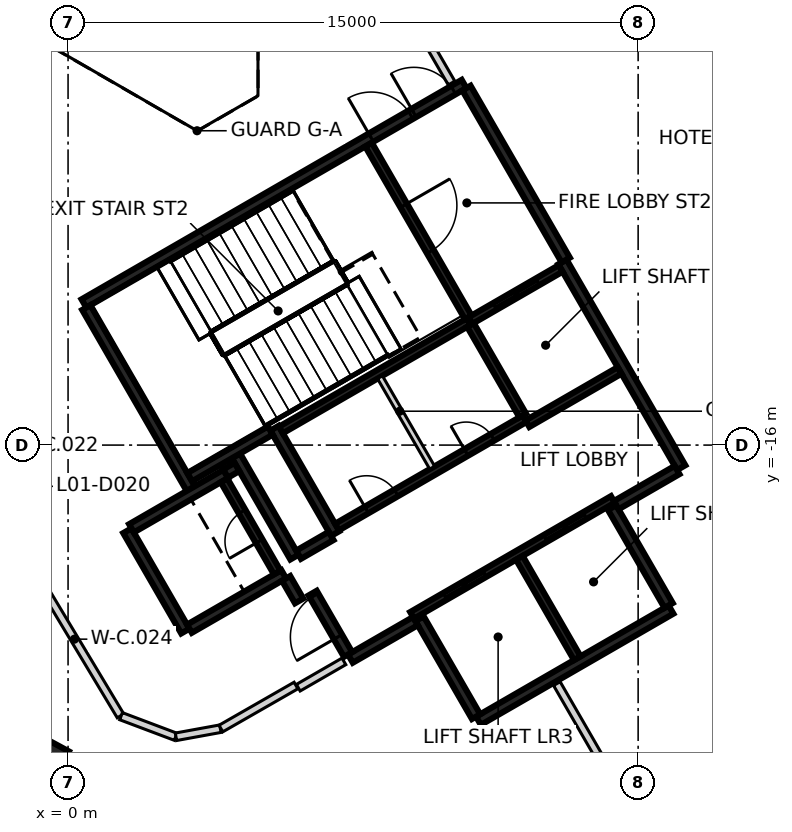
"""IFC4 building model, lengths in metres.
Left out: names, types, materials, properties, quantities, classifications, styles, units other than length and angle.
Written with IfcOpenShell. Run it as: python <this file> out.ifc"""

import sys

from ifc_helpers import new_model, si_unit, direction, frame, frame_2d, origin, origin_2d, place, context, subcontext, project, spatial, rectangle, extrude, element, fill, save


model = new_model("IFC4")
c1 = context("Model", 3, precision=1e-05, world=origin(), true_north=direction((0.0, 1.0)))
c2 = subcontext(c1, "Body", "Model", "MODEL_VIEW")
j1 = project(units=[si_unit("LENGTHUNIT", "METRE"), si_unit("PLANEANGLEUNIT", "RADIAN")], contexts=[c1])
p1 = place(None, origin())
s1 = spatial("IfcSite", under=j1, at=p1, CompositionType="ELEMENT")
p2 = place(p1, origin())
s2 = spatial("IfcBuilding", under=s1, at=p2, CompositionType="ELEMENT")
p3 = place(p2, frame((0.0, 0.0, 7.5)))
s3 = spatial("IfcBuildingStorey", under=s2, at=p3, CompositionType="ELEMENT", Elevation=7.5)
p4 = place(p3, frame((-1.197, -24.423, -0.4), z_axis=(0.0, 0.0, 1.0), x_axis=(0.476198301069, 0.879337920289, 0.0)))
e1 = element("IfcColumn", 1, at=p4, inside=s3, PredefinedType="COLUMN", context=c2, shape_type="SweptSolid", body=[
    extrude(rectangle(XDim=1.8, YDim=1.8, at=origin_2d()), origin(), (0.0, 0.0, 1.0), 4.15),
])
p5 = place(p3, frame((0.417, -12.273, 0.0), z_axis=(0.0, 0.0, 1.0), x_axis=(0.866021906294, 0.500006057782, 0.0)))
e2 = element("IfcWall", 2, at=p5, inside=s3, PredefinedType="SHEAR", context=c2, shape_type="SweptSolid", body=[
    extrude(rectangle(XDim=11.55, YDim=0.25, at=frame_2d((5.775, 0.0))), origin(), (0.0, 0.0, 1.0), 6.15),
])
p6 = place(p5, frame((10.025, 0.0, 0.0)))
e3 = element("IfcOpeningElement", 3, at=p6, cuts=e2, PredefinedType="OPENING", context=c2, shape_type="SweptSolid", body=[
    extrude(rectangle(XDim=1.2, YDim=2.1, at=frame_2d((0.6, 1.05))), frame((0.0, 0.135, 0.0), z_axis=(0.0, -1.0, 0.0), x_axis=(1.0, 0.0, 0.0)), (0.0, 0.0, 1.0), 0.27),
])
p7 = place(p5, frame((8.725, 0.0, 0.0)))
e4 = element("IfcOpeningElement", 4, at=p7, cuts=e2, PredefinedType="OPENING", context=c2, shape_type="SweptSolid", body=[
    extrude(rectangle(XDim=1.2, YDim=2.1, at=frame_2d((0.6, 1.05))), frame((0.0, 0.135, 0.0), z_axis=(0.0, -1.0, 0.0), x_axis=(1.0, 0.0, 0.0)), (0.0, 0.0, 1.0), 0.27),
])
p8 = place(p3, frame((13.008, -11.181, 0.0), z_axis=(0.0, 0.0, 1.0), x_axis=(0.500004234368, -0.866022959057, 0.0)))
e5 = element("IfcWall", 5, at=p8, inside=s3, PredefinedType="SHEAR", context=c2, shape_type="SweptSolid", body=[
    extrude(rectangle(XDim=6.25, YDim=0.25, at=frame_2d((3.125, 0.0))), origin(), (0.0, 0.0, 1.0), 6.15),
])
p9 = place(p3, frame((15.865, -20.328, 0.0), z_axis=(0.0, 0.0, 1.0), x_axis=(-0.86602852612, -0.499994591916, 0.0)))
e6 = element("IfcWall", 6, at=p9, inside=s3, PredefinedType="SHEAR", context=c2, shape_type="SweptSolid", body=[
    extrude(rectangle(XDim=5.85, YDim=0.25, at=frame_2d((2.925, 0.0))), origin(), (0.0, 0.0, 1.0), 6.15),
])
p10 = place(p3, frame((3.235, -17.153, 0.0), z_axis=(0.0, 0.0, 1.0), x_axis=(-0.500008851346, 0.866020293397, 0.0)))
e7 = element("IfcWall", 7, at=p10, inside=s3, PredefinedType="SHEAR", context=c2, shape_type="SweptSolid", body=[
    extrude(rectangle(XDim=5.51, YDim=0.25, at=frame_2d((2.755, 0.0))), origin(), (0.0, 0.0, 1.0), 6.15),
])
p11 = place(p3, frame((10.483, -6.606, 0.0), z_axis=(0.0, 0.0, 1.0), x_axis=(0.49999885962, -0.866026062182, 0.0)))
e8 = element("IfcWall", 8, at=p11, inside=s3, PredefinedType="SHEAR", context=c2, shape_type="SweptSolid", body=[
    extrude(rectangle(XDim=5.225, YDim=0.25, at=frame_2d((2.612, 0.0))), origin(), (0.0, 0.0, 1.0), 6.15),
])
p12 = place(p3, frame((7.031, -18.327, 0.0), z_axis=(0.0, 0.0, 1.0), x_axis=(-0.499971222258, 0.866042017984, 0.0)))
e9 = element("IfcWall", 9, at=p12, inside=s3, PredefinedType="SHEAR", context=c2, shape_type="SweptSolid", body=[
    extrude(rectangle(XDim=3.2, YDim=0.25, at=frame_2d((1.6, 0.0))), origin(), (0.0, 0.0, 1.0), 6.15),
])
for number, where, z_axis, x_axis in (
    (10, (14.315, -17.644, 0.0), (0.0, 0.0, 1.0), (0.5, -0.866, 0.0)),
    (11, (10.736, -23.145, 0.0), (0.0, 0.0, 1.0), (-0.5, 0.866, 0.0)),
):
    element("IfcWall", number, at=place(p3, frame(where, z_axis=z_axis, x_axis=x_axis)), inside=s3, PredefinedType="SHEAR", context=c2, shape_type="SweptSolid", body=[
        extrude(rectangle(XDim=2.974, YDim=0.25, at=frame_2d((1.487, 0.0))), origin(), (0.0, 0.0, 1.0), 6.15),
    ])
p13 = place(p3, frame((3.085, -20.894, 0.0), z_axis=(0.0, 0.0, 1.0), x_axis=(-0.499978833458, 0.866037623948, 0.0)))
e12 = element("IfcWall", 12, at=p13, inside=s3, PredefinedType="SHEAR", context=c2, shape_type="SweptSolid", body=[
    extrude(rectangle(XDim=3.05, YDim=0.25, at=frame_2d((1.525, 0.0))), origin(), (0.0, 0.0, 1.0), 6.15),
])
p14 = place(p3, frame((1.669, -18.19, 0.0), z_axis=(0.0, 0.0, 1.0), x_axis=(0.866042235819, 0.499970844928, 0.0)))
e13 = element("IfcWall", 13, at=p14, inside=s3, PredefinedType="SHEAR", context=c2, shape_type="SweptSolid", body=[
    extrude(rectangle(XDim=2.865, YDim=0.25, at=frame_2d((1.432, 0.0))), origin(), (0.0, 0.0, 1.0), 6.15),
])
p15 = place(p3, frame((5.675, -19.399, 0.0), z_axis=(0.0, 0.0, 1.0), x_axis=(-0.866026637627, -0.499997862916, 0.0)))
e14 = element("IfcWall", 14, at=p15, inside=s3, PredefinedType="SHEAR", context=c2, shape_type="SweptSolid", body=[
    extrude(rectangle(XDim=2.865, YDim=0.25, at=frame_2d((1.432, 0.0))), origin(), (0.0, 0.0, 1.0), 6.15),
])
p16 = place(p3, frame((4.414, -16.276, 0.0), z_axis=(0.0, 0.0, 1.0), x_axis=(0.500003324108, -0.866023484601, 0.0)))
e15 = element("IfcWall", 15, at=p16, inside=s3, PredefinedType="SHEAR", context=c2, shape_type="SweptSolid", body=[
    extrude(rectangle(XDim=3.085, YDim=0.25, at=frame_2d((1.542, 0.0))), origin(), (0.0, 0.0, 1.0), 6.15),
])
p17 = place(p3, frame((5.322, -15.619, 0.0), z_axis=(0.0, 0.0, 1.0), x_axis=(-0.866026229868, -0.499998569178, 0.0)))
e16 = element("IfcWall", 16, at=p17, inside=s3, PredefinedType="SHEAR", context=c2, shape_type="SweptSolid", body=[
    extrude(rectangle(XDim=2.449, YDim=0.25, at=frame_2d((1.225, 0.0))), origin(), (0.0, 0.0, 1.0), 6.15),
])
p18 = place(p3, frame((9.14, -20.631, 0.0), z_axis=(0.0, 0.0, 1.0), x_axis=(-0.866043531843, -0.499968599967, 0.0)))
e17 = element("IfcWall", 17, at=p18, inside=s3, PredefinedType="SHEAR", context=c2, shape_type="SweptSolid", body=[
    extrude(rectangle(XDim=1.975, YDim=0.25, at=frame_2d((0.987, 0.0))), origin(), (0.0, 0.0, 1.0), 6.15),
])
p19 = place(p3, frame((16.025, -16.656, 0.0), z_axis=(0.0, 0.0, 1.0), x_axis=(-0.866016279763, -0.500015802937, 0.0)))
e18 = element("IfcWall", 18, at=p19, inside=s3, PredefinedType="SHEAR", context=c2, shape_type="SweptSolid", body=[
    extrude(rectangle(XDim=1.849, YDim=0.25, at=frame_2d((0.925, 0.0))), origin(), (0.0, 0.0, 1.0), 6.15),
])
p20 = place(p3, frame((7.367, -21.51, 0.0), z_axis=(0.0, 0.0, 1.0), x_axis=(-0.499983108224, 0.866035156036, 0.0)))
e19 = element("IfcWall", 19, at=p20, inside=s3, PredefinedType="SHEAR", context=c2, shape_type="SweptSolid", body=[
    extrude(rectangle(XDim=1.865, YDim=0.25, at=frame_2d((0.932, 0.0))), origin(), (0.0, 0.0, 1.0), 6.15),
])
p21 = place(p20, frame((0.535, 0.0, 0.0)))
e20 = element("IfcOpeningElement", 20, at=p21, cuts=e19, PredefinedType="OPENING", context=c2, shape_type="SweptSolid", body=[
    extrude(rectangle(XDim=1.25, YDim=2.1, at=frame_2d((0.625, 1.05))), frame((0.0, 0.135, 0.0), z_axis=(0.0, -1.0, 0.0), x_axis=(1.0, 0.0, 0.0)), (0.0, 0.0, 1.0), 0.27),
])
p22 = place(p3, frame((6.065, -18.885, 0.0), z_axis=(0.0, 0.0, 1.0), x_axis=(0.866017078145, 0.500014420154, 0.0)))
e21 = element("IfcWall", 21, at=p22, inside=s3, PredefinedType="SHEAR", context=c2, shape_type="SweptSolid", body=[
    extrude(rectangle(XDim=0.989, YDim=0.25, at=frame_2d((0.495, 0.0))), origin(), (0.0, 0.0, 1.0), 6.15),
])
p23 = place(p3, frame((6.08, -20.1, 0.0), z_axis=(0.0, 0.0, 1.0), x_axis=(-0.500051773299, 0.865995510393, 0.0)))
e22 = element("IfcWall", 22, at=p23, inside=s3, PredefinedType="SHEAR", context=c2, shape_type="SweptSolid", body=[
    extrude(rectangle(XDim=0.685, YDim=0.25, at=frame_2d((0.342, 0.0))), origin(), (0.0, 0.0, 1.0), 6.15),
])
p24 = place(p3, frame((4.145, -16.749, 0.0), z_axis=(0.0, 0.0, 1.0), x_axis=(0.866185586049, 0.49972245349, 0.0)))
e23 = element("IfcWall", 23, at=p24, inside=s3, PredefinedType="SHEAR", context=c2, shape_type="SweptSolid", body=[
    extrude(rectangle(XDim=0.344, YDim=0.25, at=frame_2d((0.172, 0.0))), origin(), (0.0, 0.0, 1.0), 6.15),
])
p25 = place(p3, frame((9.052, -20.48, 0.0), z_axis=(0.0, 0.0, 1.0), x_axis=(0.866030299012, 0.499991521122, 0.0)))
e24 = element("IfcWall", 24, at=p25, inside=s3, PredefinedType="SHEAR", context=c2, shape_type="SweptSolid", body=[
    extrude(rectangle(XDim=6.1, YDim=0.2, at=frame_2d((3.05, 0.0))), origin(), (0.0, 0.0, 1.0), 6.15),
])
p26 = place(p25, frame((1.0, 0.0, 0.0)))
e25 = element("IfcOpeningElement", 25, at=p26, cuts=e24, PredefinedType="OPENING", context=c2, shape_type="SweptSolid", body=[
    extrude(rectangle(XDim=1.2, YDim=2.1, at=frame_2d((0.6, 1.05))), frame((0.0, 0.11, 0.0), z_axis=(0.0, -1.0, 0.0), x_axis=(1.0, 0.0, 0.0)), (0.0, 0.0, 1.0), 0.22),
])
p27 = place(p25, frame((4.05, 0.0, 0.0)))
e26 = element("IfcOpeningElement", 26, at=p27, cuts=e24, PredefinedType="OPENING", context=c2, shape_type="SweptSolid", body=[
    extrude(rectangle(XDim=1.2, YDim=2.1, at=frame_2d((0.6, 1.05))), frame((0.0, 0.11, 0.0), z_axis=(0.0, -1.0, 0.0), x_axis=(1.0, 0.0, 0.0)), (0.0, 0.0, 1.0), 0.22),
])
p28 = place(p3, frame((10.538, -12.752, 0.0), z_axis=(0.0, 0.0, 1.0), x_axis=(-0.866038630372, -0.499977090179, 0.0)))
e27 = element("IfcWall", 27, at=p28, inside=s3, PredefinedType="SHEAR", context=c2, shape_type="SweptSolid", body=[
    extrude(rectangle(XDim=5.699, YDim=0.2, at=frame_2d((2.85, 0.0))), origin(), (0.0, 0.0, 1.0), 6.15),
])
p29 = place(p3, frame((7.077, -18.156, 0.0), z_axis=(0.0, 0.0, 1.0), x_axis=(0.866038630372, 0.499977090179, 0.0)))
e28 = element("IfcWall", 28, at=p29, inside=s3, PredefinedType="SHEAR", context=c2, shape_type="SweptSolid", body=[
    extrude(rectangle(XDim=5.699, YDim=0.2, at=frame_2d((2.85, 0.0))), origin(), (0.0, 0.0, 1.0), 6.15),
])
p30 = place(p29, frame((0.899, 0.0, 0.0)))
e29 = element("IfcOpeningElement", 29, at=p30, cuts=e28, PredefinedType="OPENING", context=c2, shape_type="SweptSolid", body=[
    extrude(rectangle(XDim=0.9, YDim=2.1, at=frame_2d((0.45, 1.05))), frame((0.0, 0.11, 0.0), z_axis=(0.0, -1.0, 0.0), x_axis=(1.0, 0.0, 0.0)), (0.0, 0.0, 1.0), 0.22),
])
p31 = place(p29, frame((3.924, 0.0, 0.0)))
e30 = element("IfcOpeningElement", 30, at=p31, cuts=e28, PredefinedType="OPENING", context=c2, shape_type="SweptSolid", body=[
    extrude(rectangle(XDim=0.8, YDim=2.1, at=frame_2d((0.4, 1.05))), frame((0.0, 0.11, 0.0), z_axis=(0.0, -1.0, 0.0), x_axis=(1.0, 0.0, 0.0)), (0.0, 0.0, 1.0), 0.22),
])
p32 = place(p3, frame((7.906, -8.094, 0.0), z_axis=(0.0, 0.0, 1.0), x_axis=(0.500024287448, -0.866011380966, 0.0)))
e31 = element("IfcWall", 31, at=p32, inside=s3, PredefinedType="SHEAR", context=c2, shape_type="SweptSolid", body=[
    extrude(rectangle(XDim=5.251, YDim=0.2, at=frame_2d((2.625, 0.0))), origin(), (0.0, 0.0, 1.0), 6.15),
])
p33 = place(p32, frame((1.849, 0.0, 0.0)))
e32 = element("IfcOpeningElement", 32, at=p33, cuts=e31, PredefinedType="OPENING", context=c2, shape_type="SweptSolid", body=[
    extrude(rectangle(XDim=1.4, YDim=2.1, at=frame_2d((0.7, 1.05))), frame((0.0, 0.11, 0.0), z_axis=(0.0, -1.0, 0.0), x_axis=(1.0, 0.0, 0.0)), (0.0, 0.0, 1.0), 0.22),
])
p34 = place(p3, frame((11.875, -18.967, 0.0), z_axis=(0.0, 0.0, 1.0), x_axis=(0.49998131003, -0.866036194175, 0.0)))
e33 = element("IfcWall", 33, at=p34, inside=s3, PredefinedType="SHEAR", context=c2, shape_type="SweptSolid", body=[
    extrude(rectangle(XDim=3.048, YDim=0.2, at=frame_2d((1.524, 0.0))), origin(), (0.0, 0.0, 1.0), 6.15),
])
p35 = place(p3, frame((5.503, -19.352, 0.0), z_axis=(0.0, 0.0, 1.0), x_axis=(-0.499986818241, 0.866033014143, 0.0)))
e34 = element("IfcWall", 34, at=p35, inside=s3, PredefinedType="SHEAR", context=c2, shape_type="SweptSolid", body=[
    extrude(rectangle(XDim=2.798, YDim=0.2, at=frame_2d((1.399, 0.0))), origin(), (0.0, 0.0, 1.0), 6.15),
])
p36 = place(p35, frame((0.949, 0.0, 0.0)))
e35 = element("IfcOpeningElement", 35, at=p36, cuts=e34, PredefinedType="OPENING", context=c2, shape_type="SweptSolid", body=[
    extrude(rectangle(XDim=0.9, YDim=2.1, at=frame_2d((0.45, 1.05))), frame((0.0, 0.11, 0.0), z_axis=(0.0, -1.0, 0.0), x_axis=(1.0, 0.0, 0.0)), (0.0, 0.0, 1.0), 0.22),
])
p37 = place(p3, frame((11.963, -15.22, 0.0), z_axis=(0.0, 0.0, 1.0), x_axis=(-0.500034990121, 0.866005201286, 0.0)))
e36 = element("IfcWall", 36, at=p37, inside=s3, PredefinedType="SHEAR", context=c2, shape_type="SweptSolid", body=[
    extrude(rectangle(XDim=2.75, YDim=0.2, at=frame_2d((1.375, 0.0))), origin(), (0.0, 0.0, 1.0), 6.15),
])
p38 = place(p3, frame((10.587, -12.723, 0.0), z_axis=(0.0, 0.0, 1.0), x_axis=(0.866037306777, 0.499979382845, 0.0)))
e37 = element("IfcWall", 37, at=p38, inside=s3, PredefinedType="SHEAR", context=c2, shape_type="SweptSolid", body=[
    extrude(rectangle(XDim=2.742, YDim=0.2, at=frame_2d((1.371, 0.0))), origin(), (0.0, 0.0, 1.0), 6.15),
])
p39 = place(p38, frame((0.743, 0.0, 0.0)))
e38 = element("IfcOpeningElement", 38, at=p39, cuts=e37, PredefinedType="OPENING", context=c2, shape_type="SweptSolid", body=[
    extrude(rectangle(XDim=1.3, YDim=2.1, at=frame_2d((0.65, 1.05))), frame((0.0, 0.11, 0.0), z_axis=(0.0, -1.0, 0.0), x_axis=(1.0, 0.0, 0.0)), (0.0, 0.0, 1.0), 0.22),
])
p40 = place(p3, frame((14.512, -14.037, 0.0), z_axis=(0.0, 0.0, 1.0), x_axis=(-0.866044696403, -0.499966582715, 0.0)))
e39 = element("IfcWall", 39, at=p40, inside=s3, PredefinedType="SHEAR", context=c2, shape_type="SweptSolid", body=[
    extrude(rectangle(XDim=2.799, YDim=0.2, at=frame_2d((1.399, 0.0))), origin(), (0.0, 0.0, 1.0), 6.15),
])
p41 = place(p3, frame((8.207, -14.214, 0.0), z_axis=(0.0, 0.0, 1.0), x_axis=(0.50002746344, -0.86600954718, 0.0)))
e40 = element("IfcWall", 40, at=p41, inside=s3, PredefinedType="PARTITIONING", context=c2, shape_type="SweptSolid", body=[
    extrude(rectangle(XDim=2.748, YDim=0.15, at=frame_2d((1.374, 0.0))), origin(), (0.0, 0.0, 1.0), 6.15),
])
p42 = place(p3, frame((-1.045, -19.088, 0.0), z_axis=(0.0, 0.0, 1.0), x_axis=(0.51489213726, -0.857254971982, 0.0)))
e41 = element("IfcWall", 41, at=p42, inside=s3, PredefinedType="PARTITIONING", context=c2, shape_type="SweptSolid", body=[
    extrude(rectangle(XDim=4.709, YDim=0.2, at=frame_2d((2.354, 0.0))), origin(), (0.0, 0.0, 1.0), 6.15),
])
p43 = place(p3, frame((1.394, -23.133, 0.0), z_axis=(0.0, 0.0, 1.0), x_axis=(0.935740267615, -0.352689880154, 0.0)))
e42 = element("IfcWall", 42, at=p43, inside=s3, PredefinedType="PARTITIONING", context=c2, shape_type="SweptSolid", body=[
    extrude(rectangle(XDim=1.537, YDim=0.2, at=frame_2d((0.768, 0.0))), origin(), (0.0, 0.0, 1.0), 6.15),
])
p44 = place(p3, frame((2.839, -23.675, 0.0), z_axis=(0.0, 0.0, 1.0), x_axis=(0.983781026783, 0.179373608267, 0.0)))
e43 = element("IfcWall", 43, at=p44, inside=s3, PredefinedType="PARTITIONING", context=c2, shape_type="SweptSolid", body=[
    extrude(rectangle(XDim=1.188, YDim=0.2, at=frame_2d((0.594, 0.0))), origin(), (0.0, 0.0, 1.0), 6.15),
])
p45 = place(p3, frame((4.022, -23.458, 0.0), z_axis=(0.0, 0.0, 1.0), x_axis=(0.867589037082, 0.49728187453, 0.0)))
e44 = element("IfcWall", 44, at=p45, inside=s3, PredefinedType="PARTITIONING", context=c2, shape_type="SweptSolid", body=[
    extrude(rectangle(XDim=2.277, YDim=0.2, at=frame_2d((1.138, 0.0))), origin(), (0.0, 0.0, 1.0), 6.15),
])
p46 = place(p3, frame((6.057, -22.384, 0.0), z_axis=(0.0, 0.0, 1.0), x_axis=(0.866100566266, 0.499869792159, 0.0)))
e45 = element("IfcWall", 45, at=p46, inside=s3, PredefinedType="PARTITIONING", context=c2, shape_type="SweptSolid", body=[
    extrude(rectangle(XDim=1.386, YDim=0.2, at=frame_2d((0.693, 0.0))), origin(), (0.0, 0.0, 1.0), 6.15),
])
p47 = place(p3, frame((9.508, -5.468, 0.0), z_axis=(0.0, 0.0, 1.0), x_axis=(0.500970056897, -0.865464616315, 0.0)))
e46 = element("IfcWall", 46, at=p47, inside=s3, PredefinedType="PARTITIONING", context=c2, shape_type="SweptSolid", body=[
    extrude(rectangle(XDim=1.163, YDim=0.2, at=frame_2d((0.582, 0.0))), origin(), (0.0, 0.0, 1.0), 6.15),
])
p48 = place(p3, frame((12.861, -22.276, 0.0), z_axis=(0.0, 0.0, 1.0), x_axis=(0.499989278408, -0.86603159381, 0.0)))
e47 = element("IfcWall", 47, at=p48, inside=s3, PredefinedType="PARTITIONING", context=c2, shape_type="SweptSolid", body=[
    extrude(rectangle(XDim=19.273, YDim=0.2, at=frame_2d((9.636, 0.0))), origin(), (0.0, 0.0, 1.0), 6.15),
])
p49 = place(p39, origin())
e48 = element("IfcDoor", 48, at=p49, inside=s3, OperationType="SLIDING_TO_LEFT", PredefinedType="DOOR", context=c2, shape_type="SweptSolid", body=[
    extrude(rectangle(XDim=1.3, YDim=2.1, at=frame_2d((0.65, 1.05))), frame((0.0, 0.025, 0.0), z_axis=(0.0, -1.0, 0.0), x_axis=(1.0, 0.0, 0.0)), (0.0, 0.0, 1.0), 0.05),
])
fill(e38, e48)
p50 = place(p26, origin())
e49 = element("IfcDoor", 49, at=p50, inside=s3, OperationType="DOUBLE_DOOR_SLIDING", PredefinedType="DOOR", context=c2, shape_type="SweptSolid", body=[
    extrude(rectangle(XDim=1.2, YDim=2.1, at=frame_2d((0.6, 1.05))), frame((0.0, 0.025, 0.0), z_axis=(0.0, -1.0, 0.0), x_axis=(1.0, 0.0, 0.0)), (0.0, 0.0, 1.0), 0.05),
])
fill(e25, e49)
p51 = place(p27, origin())
e50 = element("IfcDoor", 50, at=p51, inside=s3, OperationType="DOUBLE_DOOR_SLIDING", PredefinedType="DOOR", context=c2, shape_type="SweptSolid", body=[
    extrude(rectangle(XDim=1.2, YDim=2.1, at=frame_2d((0.6, 1.05))), frame((0.0, 0.025, 0.0), z_axis=(0.0, -1.0, 0.0), x_axis=(1.0, 0.0, 0.0)), (0.0, 0.0, 1.0), 0.05),
])
fill(e26, e50)
p52 = place(p21, origin())
e51 = element("IfcDoor", 51, at=p52, inside=s3, OperationType="SINGLE_SWING_LEFT", PredefinedType="DOOR", context=c2, shape_type="SweptSolid", body=[
    extrude(rectangle(XDim=1.25, YDim=2.1, at=frame_2d((0.625, 1.05))), frame((0.0, 0.025, 0.0), z_axis=(0.0, -1.0, 0.0), x_axis=(1.0, 0.0, 0.0)), (0.0, 0.0, 1.0), 0.05),
])
fill(e20, e51)
p53 = place(p6, origin())
e52 = element("IfcDoor", 52, at=p53, inside=s3, OperationType="SINGLE_SWING_LEFT", PredefinedType="DOOR", context=c2, shape_type="SweptSolid", body=[
    extrude(rectangle(XDim=1.2, YDim=2.1, at=frame_2d((0.6, 1.05))), frame((0.0, 0.025, 0.0), z_axis=(0.0, -1.0, 0.0), x_axis=(1.0, 0.0, 0.0)), (0.0, 0.0, 1.0), 0.05),
])
fill(e3, e52)
p54 = place(p7, origin())
e53 = element("IfcDoor", 53, at=p54, inside=s3, OperationType="SINGLE_SWING_RIGHT", PredefinedType="DOOR", context=c2, shape_type="SweptSolid", body=[
    extrude(rectangle(XDim=1.2, YDim=2.1, at=frame_2d((0.6, 1.05))), frame((0.0, 0.025, 0.0), z_axis=(0.0, -1.0, 0.0), x_axis=(1.0, 0.0, 0.0)), (0.0, 0.0, 1.0), 0.05),
])
fill(e4, e53)
p55 = place(p33, origin())
e54 = element("IfcDoor", 54, at=p55, inside=s3, OperationType="SINGLE_SWING_LEFT", PredefinedType="DOOR", context=c2, shape_type="SweptSolid", body=[
    extrude(rectangle(XDim=1.4, YDim=2.1, at=frame_2d((0.7, 1.05))), frame((0.0, 0.025, 0.0), z_axis=(0.0, -1.0, 0.0), x_axis=(1.0, 0.0, 0.0)), (0.0, 0.0, 1.0), 0.05),
])
fill(e32, e54)
p56 = place(p30, origin())
e55 = element("IfcDoor", 55, at=p56, inside=s3, OperationType="SINGLE_SWING_RIGHT", PredefinedType="DOOR", context=c2, shape_type="SweptSolid", body=[
    extrude(rectangle(XDim=0.9, YDim=2.1, at=frame_2d((0.45, 1.05))), frame((0.0, 0.025, 0.0), z_axis=(0.0, -1.0, 0.0), x_axis=(1.0, 0.0, 0.0)), (0.0, 0.0, 1.0), 0.05),
])
fill(e29, e55)
p57 = place(p31, origin())
e56 = element("IfcDoor", 56, at=p57, inside=s3, OperationType="SINGLE_SWING_LEFT", PredefinedType="DOOR", context=c2, shape_type="SweptSolid", body=[
    extrude(rectangle(XDim=0.8, YDim=2.1, at=frame_2d((0.4, 1.05))), frame((0.0, 0.025, 0.0), z_axis=(0.0, -1.0, 0.0), x_axis=(1.0, 0.0, 0.0)), (0.0, 0.0, 1.0), 0.05),
])
fill(e30, e56)
p58 = place(p36, origin())
e57 = element("IfcDoor", 57, at=p58, inside=s3, OperationType="SINGLE_SWING_RIGHT", PredefinedType="DOOR", context=c2, shape_type="SweptSolid", body=[
    extrude(rectangle(XDim=0.9, YDim=2.1, at=frame_2d((0.45, 1.05))), frame((0.0, 0.025, 0.0), z_axis=(0.0, -1.0, 0.0), x_axis=(1.0, 0.0, 0.0)), (0.0, 0.0, 1.0), 0.05),
])
fill(e35, e57)
save(model, sys.argv[1])
